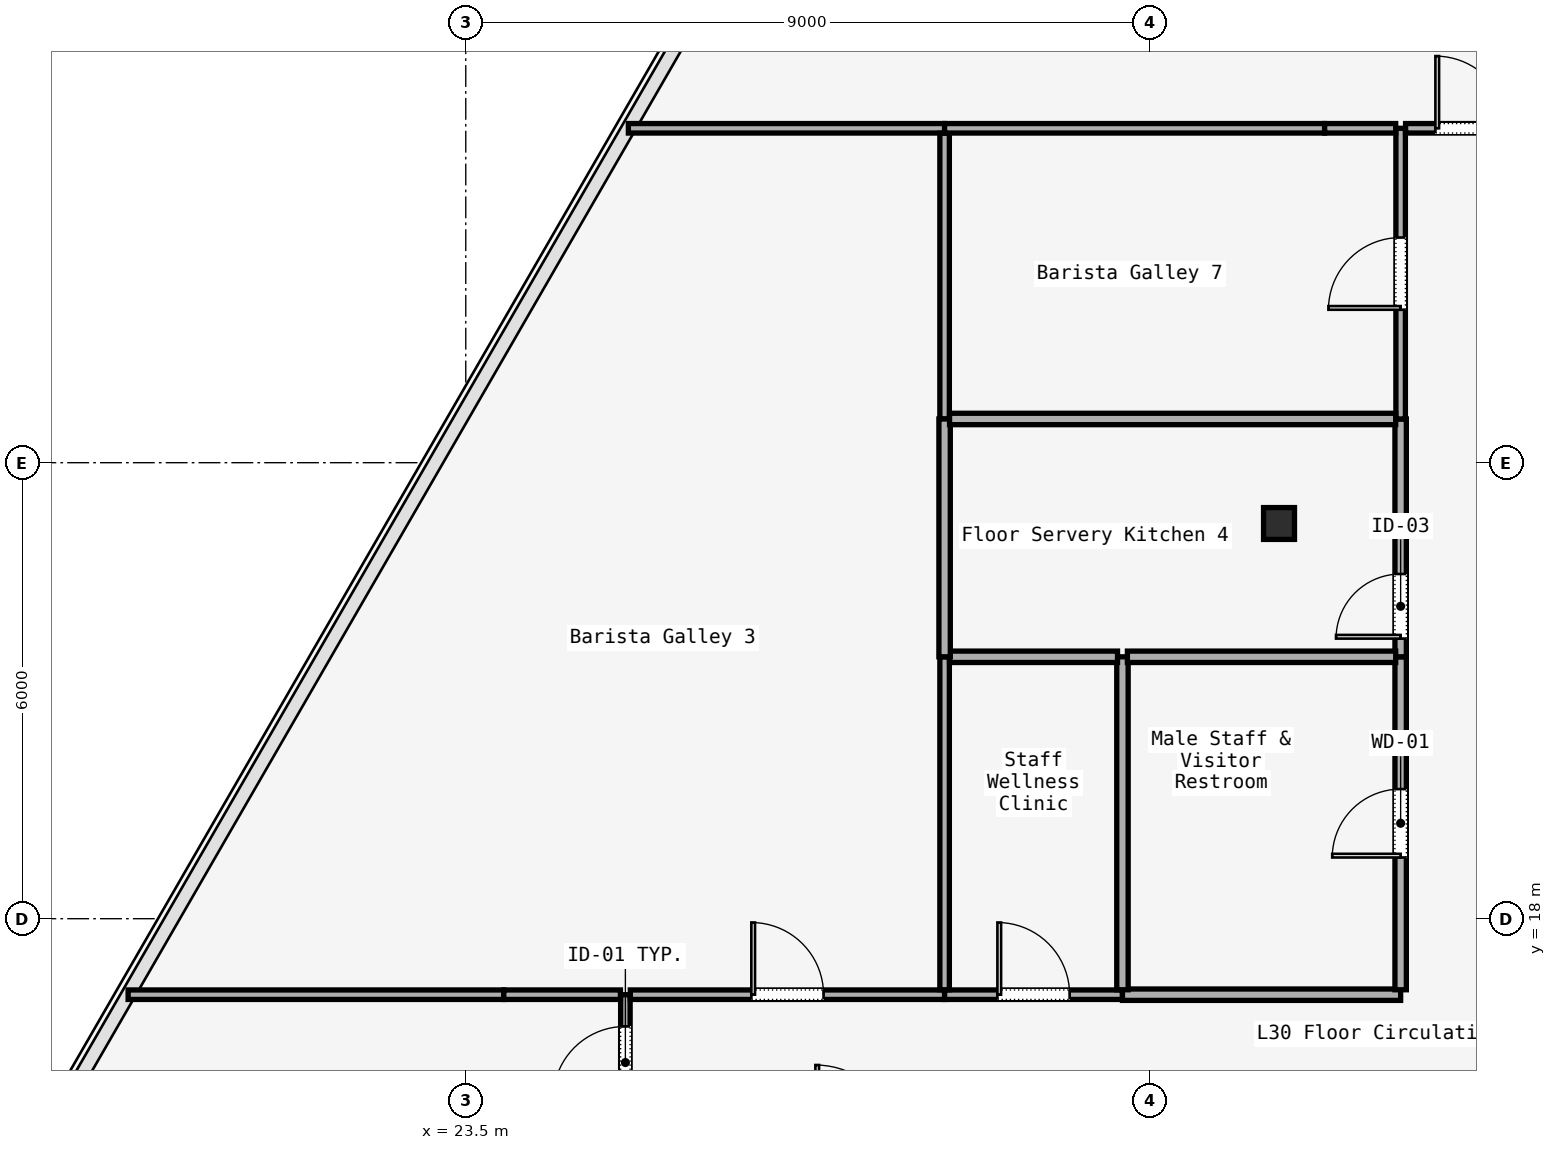
"""IFC4 building model, lengths in metres.
Left out: names, types, materials, properties, quantities, classifications, styles, units other than length and angle.
Written with IfcOpenShell. Run it as: python <this file> out.ifc"""

import sys

from ifc_helpers import new_model, si_unit, direction, frame, frame_2d, origin, origin_2d, place, context, subcontext, project, spatial, rectangle, i_section, extrude, element, fill, save


model = new_model("IFC4")
c1 = context("Model", 3, precision=1e-05, world=origin(), true_north=direction((0.0, 1.0)))
c2 = subcontext(c1, "Body", "Model", "MODEL_VIEW")
j1 = project(units=[si_unit("LENGTHUNIT", "METRE"), si_unit("PLANEANGLEUNIT", "RADIAN")], contexts=[c1])
p1 = place(None, origin())
s1 = spatial("IfcSite", under=j1, at=p1, CompositionType="ELEMENT")
p2 = place(p1, origin())
s2 = spatial("IfcBuilding", under=s1, at=p2, CompositionType="ELEMENT")
p3 = place(p2, frame((0.0, 0.0, 130.8)))
s3 = spatial("IfcBuildingStorey", under=s2, at=p3, CompositionType="ELEMENT", Elevation=130.8)
p4 = place(p3, frame((34.2, 23.2, 0.0), z_axis=(0.0, 0.0, 1.0), x_axis=(1.0, 0.0, 0.0)))
e1 = element("IfcColumn", 1, at=p4, inside=s3, PredefinedType="COLUMN", context=c2, shape_type="SweptSolid", body=[
    extrude(i_section(OverallWidth=0.407, OverallDepth=0.419, WebThickness=0.031, FlangeThickness=0.049, FilletRadius=0.015, at=origin_2d()), origin(), (0.0, 0.0, 1.0), 3.58),
])
p5 = place(p3, frame((25.6, 15.215, 0.0), z_axis=(0.0, 0.0, 1.0), x_axis=(0.0, 1.0, 0.0)))
e2 = element("IfcWall", 2, at=p5, inside=s3, PredefinedType="PARTITIONING", context=c2, shape_type="SweptSolid", body=[
    extrude(rectangle(XDim=1.785, YDim=0.125, at=frame_2d((0.893, 0.0))), origin(), (0.0, 0.0, 1.0), 3.01),
])
p6 = place(p5, frame((0.417, 0.0, 0.0)))
e3 = element("IfcOpeningElement", 3, at=p6, cuts=e2, PredefinedType="OPENING", context=c2, shape_type="SweptSolid", body=[
    extrude(rectangle(XDim=0.95, YDim=2.2, at=frame_2d((0.475, 1.1))), frame((0.0, 0.062, 0.0), z_axis=(0.0, -1.0, 0.0), x_axis=(1.0, 0.0, 0.0)), (0.0, 0.0, 1.0), 0.125),
])
p7 = place(p3, frame((25.665, 17.0, 0.0), z_axis=(0.0, 0.0, 1.0), x_axis=(1.0, 0.0, 0.0)))
e4 = element("IfcWall", 4, at=p7, inside=s3, PredefinedType="PARTITIONING", context=c2, shape_type="SweptSolid", body=[
    extrude(rectangle(XDim=4.135, YDim=0.125, at=frame_2d((2.067, 0.0))), origin(), (0.0, 0.0, 1.0), 3.01),
])
p8 = place(p7, frame((1.593, 0.0, 0.0)))
e5 = element("IfcOpeningElement", 5, at=p8, cuts=e4, PredefinedType="OPENING", context=c2, shape_type="SweptSolid", body=[
    extrude(rectangle(XDim=0.95, YDim=2.2, at=frame_2d((0.475, 1.1))), frame((0.0, 0.062, 0.0), z_axis=(0.0, -1.0, 0.0), x_axis=(1.0, 0.0, 0.0)), (0.0, 0.0, 1.0), 0.125),
])
p9 = place(p3, frame((29.8, 17.0, 0.0), z_axis=(0.0, 0.0, 1.0), x_axis=(1.0, 0.0, 0.0)))
e6 = element("IfcWall", 6, at=p9, inside=s3, PredefinedType="PARTITIONING", context=c2, shape_type="SweptSolid", body=[
    extrude(rectangle(XDim=2.34, YDim=0.125, at=frame_2d((1.17, 0.0))), origin(), (0.0, 0.0, 1.0), 3.01),
])
p10 = place(p9, frame((0.695, 0.0, 0.0)))
e7 = element("IfcOpeningElement", 7, at=p10, cuts=e6, PredefinedType="OPENING", context=c2, shape_type="SweptSolid", body=[
    extrude(rectangle(XDim=0.95, YDim=2.2, at=frame_2d((0.475, 1.1))), frame((0.0, 0.062, 0.0), z_axis=(0.0, -1.0, 0.0), x_axis=(1.0, 0.0, 0.0)), (0.0, 0.0, 1.0), 0.125),
])
p11 = place(p3, frame((32.14, 17.0, 0.0), z_axis=(0.0, 0.0, 1.0), x_axis=(1.0, 0.0, 0.0)))
e8 = element("IfcWall", 8, at=p11, inside=s3, PredefinedType="PARTITIONING", context=c2, shape_type="SweptSolid", body=[
    extrude(rectangle(XDim=3.66, YDim=0.15, at=frame_2d((1.83, 0.0))), origin(), (0.0, 0.0, 1.0), 3.01),
])
p12 = place(p3, frame((35.8, 17.065, 0.0), z_axis=(0.0, 0.0, 1.0), x_axis=(0.0, 1.0, 0.0)))
e9 = element("IfcWall", 9, at=p12, inside=s3, PredefinedType="PARTITIONING", context=c2, shape_type="SweptSolid", body=[
    extrude(rectangle(XDim=4.381, YDim=0.15, at=frame_2d((2.19, 0.0))), origin(), (0.0, 0.0, 1.0), 3.01),
])
p13 = place(p12, frame((1.74, 0.0, 0.0)))
e10 = element("IfcOpeningElement", 10, at=p13, cuts=e9, PredefinedType="OPENING", context=c2, shape_type="SweptSolid", body=[
    extrude(rectangle(XDim=0.9, YDim=2.15, at=frame_2d((0.45, 1.075))), frame((0.0, 0.075, 0.0), z_axis=(0.0, -1.0, 0.0), x_axis=(1.0, 0.0, 0.0)), (0.0, 0.0, 1.0), 0.15),
])
p14 = place(p3, frame((35.8, 21.446, 0.0), z_axis=(0.0, 0.0, 1.0), x_axis=(0.0, 1.0, 0.0)))
e11 = element("IfcWall", 11, at=p14, inside=s3, PredefinedType="PARTITIONING", context=c2, shape_type="SweptSolid", body=[
    extrude(rectangle(XDim=3.129, YDim=0.15, at=frame_2d((1.564, 0.0))), origin(), (0.0, 0.0, 1.0), 3.01),
])
p15 = place(p14, frame((0.24, 0.0, 0.0)))
e12 = element("IfcOpeningElement", 12, at=p15, cuts=e11, PredefinedType="OPENING", context=c2, shape_type="SweptSolid", body=[
    extrude(rectangle(XDim=0.85, YDim=2.15, at=frame_2d((0.425, 1.075))), frame((0.0, 0.075, 0.0), z_axis=(0.0, -1.0, 0.0), x_axis=(1.0, 0.0, 0.0)), (0.0, 0.0, 1.0), 0.15),
])
p16 = place(p3, frame((35.8, 24.575, 0.0), z_axis=(0.0, 0.0, 1.0), x_axis=(0.0, 1.0, 0.0)))
e13 = element("IfcWall", 13, at=p16, inside=s3, PredefinedType="PARTITIONING", context=c2, shape_type="SweptSolid", body=[
    extrude(rectangle(XDim=3.825, YDim=0.125, at=frame_2d((1.912, 0.0))), origin(), (0.0, 0.0, 1.0), 3.01),
])
p17 = place(p16, frame((1.437, 0.0, 0.0)))
e14 = element("IfcOpeningElement", 14, at=p17, cuts=e13, PredefinedType="OPENING", context=c2, shape_type="SweptSolid", body=[
    extrude(rectangle(XDim=0.95, YDim=2.2, at=frame_2d((0.475, 1.1))), frame((0.0, 0.062, 0.0), z_axis=(0.0, -1.0, 0.0), x_axis=(1.0, 0.0, 0.0)), (0.0, 0.0, 1.0), 0.125),
])
p18 = place(p3, frame((35.865, 28.4, 0.0), z_axis=(0.0, 0.0, 1.0), x_axis=(1.0, 0.0, 0.0)))
e15 = element("IfcWall", 15, at=p18, inside=s3, PredefinedType="PARTITIONING", context=c2, shape_type="SweptSolid", body=[
    extrude(rectangle(XDim=1.735, YDim=0.125, at=frame_2d((0.868, 0.0))), origin(), (0.0, 0.0, 1.0), 3.01),
])
p19 = place(p18, frame((0.393, 0.0, 0.0)))
e16 = element("IfcOpeningElement", 16, at=p19, cuts=e15, PredefinedType="OPENING", context=c2, shape_type="SweptSolid", body=[
    extrude(rectangle(XDim=0.95, YDim=2.2, at=frame_2d((0.475, 1.1))), frame((0.0, 0.062, 0.0), z_axis=(0.0, -1.0, 0.0), x_axis=(1.0, 0.0, 0.0)), (0.0, 0.0, 1.0), 0.125),
])
p20 = place(p3, frame((19.058, 17.0, 0.0), z_axis=(0.0, 0.0, 1.0), x_axis=(1.0, 0.0, 0.0)))
e17 = element("IfcWall", 17, at=p20, inside=s3, PredefinedType="PARTITIONING", context=c2, shape_type="SweptSolid", body=[
    extrude(rectangle(XDim=4.942, YDim=0.125, at=frame_2d((2.471, 0.0))), origin(), (0.0, 0.0, 1.0), 3.01),
])
p21 = place(p3, frame((24.0, 17.0, 0.0), z_axis=(0.0, 0.0, 1.0), x_axis=(1.0, 0.0, 0.0)))
e18 = element("IfcWall", 18, at=p21, inside=s3, PredefinedType="PARTITIONING", context=c2, shape_type="SweptSolid", body=[
    extrude(rectangle(XDim=1.535, YDim=0.125, at=frame_2d((0.768, 0.0))), origin(), (0.0, 0.0, 1.0), 3.01),
])
p22 = place(p3, frame((32.14, 21.446, 0.0), z_axis=(0.0, 0.0, 1.0), x_axis=(0.0, -1.0, 0.0)))
e19 = element("IfcWall", 19, at=p22, inside=s3, PredefinedType="PARTITIONING", context=c2, shape_type="SweptSolid", body=[
    extrude(rectangle(XDim=4.381, YDim=0.15, at=frame_2d((2.19, 0.0))), origin(), (0.0, 0.0, 1.0), 3.01),
])
p23 = place(p3, frame((29.8, 17.065, 0.0), z_axis=(0.0, 0.0, 1.0), x_axis=(0.0, 1.0, 0.0)))
e20 = element("IfcWall", 20, at=p23, inside=s3, PredefinedType="PARTITIONING", context=c2, shape_type="SweptSolid", body=[
    extrude(rectangle(XDim=4.381, YDim=0.125, at=frame_2d((2.19, 0.0))), origin(), (0.0, 0.0, 1.0), 3.01),
])
p24 = place(p3, frame((29.865, 21.446, 0.0), z_axis=(0.0, 0.0, 1.0), x_axis=(1.0, 0.0, 0.0)))
e21 = element("IfcWall", 21, at=p24, inside=s3, PredefinedType="PARTITIONING", context=c2, shape_type="SweptSolid", body=[
    extrude(rectangle(XDim=2.21, YDim=0.15, at=frame_2d((1.105, 0.0))), origin(), (0.0, 0.0, 1.0), 3.01),
])
p25 = place(p3, frame((32.205, 21.446, 0.0), z_axis=(0.0, 0.0, 1.0), x_axis=(1.0, 0.0, 0.0)))
e22 = element("IfcWall", 22, at=p25, inside=s3, PredefinedType="PARTITIONING", context=c2, shape_type="SweptSolid", body=[
    extrude(rectangle(XDim=3.53, YDim=0.15, at=frame_2d((1.765, 0.0))), origin(), (0.0, 0.0, 1.0), 3.01),
])
p26 = place(p3, frame((25.639, 28.4, 0.0), z_axis=(0.0, 0.0, 1.0), x_axis=(1.0, 0.0, 0.0)))
e23 = element("IfcWall", 23, at=p26, inside=s3, PredefinedType="PARTITIONING", context=c2, shape_type="SweptSolid", body=[
    extrude(rectangle(XDim=4.161, YDim=0.125, at=frame_2d((2.08, 0.0))), origin(), (0.0, 0.0, 1.0), 3.01),
])
p27 = place(p3, frame((29.8, 28.335, 0.0), z_axis=(0.0, 0.0, 1.0), x_axis=(0.0, -1.0, 0.0)))
e24 = element("IfcWall", 24, at=p27, inside=s3, PredefinedType="PARTITIONING", context=c2, shape_type="SweptSolid", body=[
    extrude(rectangle(XDim=3.76, YDim=0.125, at=frame_2d((1.88, 0.0))), origin(), (0.0, 0.0, 1.0), 3.01),
])
p28 = place(p3, frame((29.8, 24.575, 0.0), z_axis=(0.0, 0.0, 1.0), x_axis=(0.0, -1.0, 0.0)))
e25 = element("IfcWall", 25, at=p28, inside=s3, PredefinedType="PARTITIONING", context=c2, shape_type="SweptSolid", body=[
    extrude(rectangle(XDim=3.129, YDim=0.15, at=frame_2d((1.564, 0.0))), origin(), (0.0, 0.0, 1.0), 3.01),
])
p29 = place(p3, frame((29.865, 24.575, 0.0), z_axis=(0.0, 0.0, 1.0), x_axis=(1.0, 0.0, 0.0)))
e26 = element("IfcWall", 26, at=p29, inside=s3, PredefinedType="PARTITIONING", context=c2, shape_type="SweptSolid", body=[
    extrude(rectangle(XDim=5.87, YDim=0.15, at=frame_2d((2.935, 0.0))), origin(), (0.0, 0.0, 1.0), 3.01),
])
p30 = place(p3, frame((29.8, 28.4, 0.0), z_axis=(0.0, 0.0, 1.0), x_axis=(1.0, 0.0, 0.0)))
e27 = element("IfcWall", 27, at=p30, inside=s3, PredefinedType="PARTITIONING", context=c2, shape_type="SweptSolid", body=[
    extrude(rectangle(XDim=5.0, YDim=0.125, at=frame_2d((2.5, 0.0))), origin(), (0.0, 0.0, 1.0), 3.01),
])
p31 = place(p3, frame((34.8, 28.4, 0.0), z_axis=(0.0, 0.0, 1.0), x_axis=(1.0, 0.0, 0.0)))
e28 = element("IfcWall", 28, at=p31, inside=s3, PredefinedType="PARTITIONING", context=c2, shape_type="SweptSolid", body=[
    extrude(rectangle(XDim=0.935, YDim=0.125, at=frame_2d((0.468, 0.0))), origin(), (0.0, 0.0, 1.0), 3.01),
])
p32 = place(p6, origin())
e29 = element("IfcDoor", 29, at=p32, inside=s3, OperationType="SINGLE_SWING_LEFT", PredefinedType="DOOR", context=c2, shape_type="SweptSolid", body=[
    extrude(rectangle(XDim=0.95, YDim=2.2, at=frame_2d((0.475, 1.1))), frame((0.0, 0.025, 0.0), z_axis=(0.0, -1.0, 0.0), x_axis=(1.0, 0.0, 0.0)), (0.0, 0.0, 1.0), 0.05),
])
fill(e3, e29)
p33 = place(p10, origin())
e30 = element("IfcDoor", 30, at=p33, inside=s3, OperationType="SINGLE_SWING_LEFT", PredefinedType="DOOR", context=c2, shape_type="SweptSolid", body=[
    extrude(rectangle(XDim=0.95, YDim=2.2, at=frame_2d((0.475, 1.1))), frame((0.0, 0.025, 0.0), z_axis=(0.0, -1.0, 0.0), x_axis=(1.0, 0.0, 0.0)), (0.0, 0.0, 1.0), 0.05),
])
fill(e7, e30)
p34 = place(p13, origin())
e31 = element("IfcDoor", 31, at=p34, inside=s3, OperationType="SINGLE_SWING_RIGHT", PredefinedType="DOOR", context=c2, shape_type="SweptSolid", body=[
    extrude(rectangle(XDim=0.9, YDim=2.15, at=frame_2d((0.45, 1.075))), frame((0.0, 0.025, 0.0), z_axis=(0.0, -1.0, 0.0), x_axis=(1.0, 0.0, 0.0)), (0.0, 0.0, 1.0), 0.05),
])
fill(e10, e31)
p35 = place(p8, origin())
e32 = element("IfcDoor", 32, at=p35, inside=s3, OperationType="SINGLE_SWING_RIGHT", PredefinedType="DOOR", context=c2, shape_type="SweptSolid", body=[
    extrude(rectangle(XDim=0.95, YDim=2.2, at=frame_2d((0.475, 1.1))), frame((0.0, 0.025, 0.0), z_axis=(0.0, -1.0, 0.0), x_axis=(1.0, 0.0, 0.0)), (0.0, 0.0, 1.0), 0.05),
])
fill(e5, e32)
p36 = place(p15, origin())
e33 = element("IfcDoor", 33, at=p36, inside=s3, OperationType="SINGLE_SWING_LEFT", PredefinedType="DOOR", context=c2, shape_type="SweptSolid", body=[
    extrude(rectangle(XDim=0.85, YDim=2.15, at=frame_2d((0.425, 1.075))), frame((0.0, 0.025, 0.0), z_axis=(0.0, -1.0, 0.0), x_axis=(1.0, 0.0, 0.0)), (0.0, 0.0, 1.0), 0.05),
])
fill(e12, e33)
p37 = place(p17, origin())
e34 = element("IfcDoor", 34, at=p37, inside=s3, OperationType="SINGLE_SWING_RIGHT", PredefinedType="DOOR", context=c2, shape_type="SweptSolid", body=[
    extrude(rectangle(XDim=0.95, YDim=2.2, at=frame_2d((0.475, 1.1))), frame((0.0, 0.025, 0.0), z_axis=(0.0, -1.0, 0.0), x_axis=(1.0, 0.0, 0.0)), (0.0, 0.0, 1.0), 0.05),
])
fill(e14, e34)
p38 = place(p19, origin())
e35 = element("IfcDoor", 35, at=p38, inside=s3, OperationType="SINGLE_SWING_LEFT", PredefinedType="DOOR", context=c2, shape_type="SweptSolid", body=[
    extrude(rectangle(XDim=0.95, YDim=2.2, at=frame_2d((0.475, 1.1))), frame((0.0, 0.025, 0.0), z_axis=(0.0, -1.0, 0.0), x_axis=(1.0, 0.0, 0.0)), (0.0, 0.0, 1.0), 0.05),
])
fill(e16, e35)
save(model, sys.argv[1])
